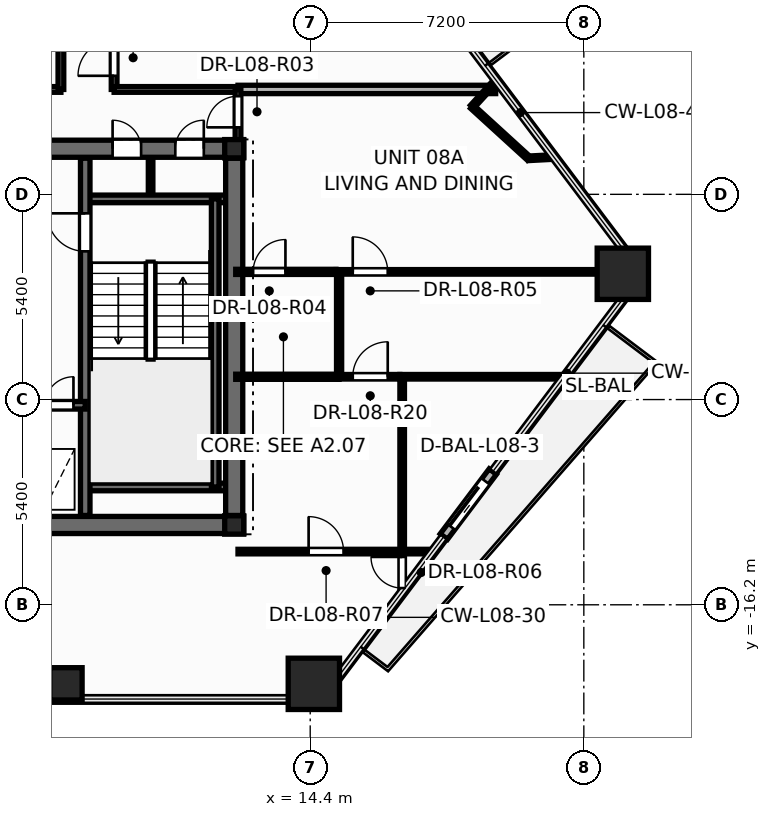
"""IFC4 building model, lengths in metres.
Left out: names, types, materials, properties, quantities, classifications, styles, units other than length and angle.
Written with IfcOpenShell. Run it as: python <this file> out.ifc"""

import sys

from ifc_helpers import new_model, si_unit, direction, frame, frame_2d, origin, origin_2d, place, context, subcontext, project, spatial, rectangle, hollow_rectangle, hollow_circle, i_section, extrude, element, fill, save


model = new_model("IFC4")
c1 = context("Model", 3, precision=1e-05, world=origin(), true_north=direction((0.0, 1.0)))
c2 = subcontext(c1, "Body", "Model", "MODEL_VIEW")
j1 = project(units=[si_unit("LENGTHUNIT", "METRE"), si_unit("PLANEANGLEUNIT", "RADIAN")], contexts=[c1])
p1 = place(None, origin())
s1 = spatial("IfcSite", under=j1, at=p1, CompositionType="ELEMENT")
p2 = place(p1, origin())
s2 = spatial("IfcBuilding", under=s1, at=p2, CompositionType="ELEMENT")
p3 = place(p2, frame((0.0, 0.0, 35.1)))
s3 = spatial("IfcBuildingStorey", under=s2, at=p3, CompositionType="ELEMENT", Elevation=35.1)
for number, where, z_axis, x_axis in (
    (1, (14.496, -18.28, 0.0), (0.0, 0.0, 1.0), (1.0, 0.0, 0.0)),
    (2, (22.626, -7.49, 0.0), (0.0, 0.0, 1.0), (1.0, 0.0, 0.0)),
):
    element("IfcColumn", number, at=place(p3, frame(where, z_axis=z_axis, x_axis=x_axis)), inside=s3, PredefinedType="COLUMN", context=c2, shape_type="SweptSolid", body=[
        extrude(hollow_rectangle(XDim=1.35, YDim=1.35, WallThickness=0.065, at=origin_2d()), origin(), (0.0, 0.0, 1.0), 3.6),
    ])
p4 = place(p3, frame((7.973, -18.28, 0.0), z_axis=(0.0, 0.0, 1.0), x_axis=(1.0, 0.0, 0.0)))
e3 = element("IfcColumn", 3, at=p4, inside=s3, PredefinedType="COLUMN", context=c2, shape_type="SweptSolid", body=[
    extrude(hollow_circle(Radius=0.425, WallThickness=0.038, at=origin_2d()), origin(), (0.0, 0.0, 1.0), 3.6),
])
for number, where, z_axis, x_axis in (
    (4, (12.4, -14.1, 0.0), (0.0, 0.0, 1.0), (1.0, 0.0, 0.0)),
    (5, (12.4, -4.2, 0.0), (0.0, 0.0, 1.0), (1.0, 0.0, 0.0)),
):
    element("IfcColumn", number, at=place(p3, frame(where, z_axis=z_axis, x_axis=x_axis)), inside=s3, PredefinedType="COLUMN", context=c2, shape_type="SweptSolid", body=[
        extrude(i_section(OverallWidth=0.5, OverallDepth=0.482, WebThickness=0.04, FlangeThickness=0.045, at=origin_2d()), origin(), (0.0, 0.0, 1.0), 3.6),
    ])
p5 = place(p3, frame((17.917, -14.405, -0.015), z_axis=(0.0, 0.0, 1.0), x_axis=(0.601896635284, 0.798574004357, 0.0)))
e6 = element("IfcWall", 6, at=p5, inside=s3, PredefinedType="STANDARD", context=c2, shape_type="SweptSolid", body=[
    extrude(rectangle(XDim=2.14, YDim=0.24, at=frame_2d((1.07, 0.0))), origin(), (0.0, 0.0, 1.0), 2.729),
])
p6 = place(p5, frame((0.32, 0.0, 0.015)))
e7 = element("IfcOpeningElement", 7, at=p6, cuts=e6, PredefinedType="OPENING", context=c2, shape_type="SweptSolid", body=[
    extrude(rectangle(XDim=1.506, YDim=2.204, at=frame_2d((0.75, 1.102))), frame((0.0, 0.13, 0.0), z_axis=(0.0, -1.0, 0.0), x_axis=(1.0, 0.0, 0.0)), (0.0, 0.0, 1.0), 0.26),
])
p7 = place(p3, frame((10.2, -5.52, 0.0), z_axis=(0.0, 0.0, 1.0), x_axis=(0.0, 1.0, 0.0)))
e8 = element("IfcWall", 8, at=p7, inside=s3, PredefinedType="PARTITIONING", context=c2, shape_type="SweptSolid", body=[
    extrude(rectangle(XDim=1.12, YDim=0.12, at=frame_2d((0.56, 0.0))), origin(), (0.0, 0.0, 1.0), 3.35),
])
p8 = place(p3, frame((-12.65, -14.1, 0.0), z_axis=(0.0, 0.0, 1.0), x_axis=(1.0, 0.0, 0.0)))
e9 = element("IfcWall", 9, at=p8, inside=s3, PredefinedType="SHEAR", context=c2, shape_type="SweptSolid", body=[
    extrude(rectangle(XDim=25.3, YDim=0.45, at=frame_2d((12.65, 0.0))), origin(), (0.0, 0.0, 1.0), 3.6),
])
p9 = place(p3, frame((-12.65, -4.2, 0.0), z_axis=(0.0, 0.0, 1.0), x_axis=(1.0, 0.0, 0.0)))
e10 = element("IfcWall", 10, at=p9, inside=s3, PredefinedType="SHEAR", context=c2, shape_type="SweptSolid", body=[
    extrude(rectangle(XDim=25.3, YDim=0.45, at=frame_2d((12.65, 0.0))), origin(), (0.0, 0.0, 1.0), 3.6),
])
p10 = place(p9, frame((0.95, 0.0, 0.0)))
e11 = element("IfcOpeningElement", 11, at=p10, cuts=e10, PredefinedType="OPENING", context=c2, shape_type="SweptSolid", body=[
    extrude(rectangle(XDim=0.756, YDim=2.054, at=frame_2d((0.375, 1.027))), frame((0.0, 0.235, 0.0), z_axis=(0.0, -1.0, 0.0), x_axis=(1.0, 0.0, 0.0)), (0.0, 0.0, 1.0), 0.47),
])
p11 = place(p9, frame((2.6, 0.0, 0.0)))
e12 = element("IfcOpeningElement", 12, at=p11, cuts=e10, PredefinedType="OPENING", context=c2, shape_type="SweptSolid", body=[
    extrude(rectangle(XDim=0.756, YDim=2.054, at=frame_2d((0.375, 1.027))), frame((0.0, 0.235, 0.0), z_axis=(0.0, -1.0, 0.0), x_axis=(1.0, 0.0, 0.0)), (0.0, 0.0, 1.0), 0.47),
])
p12 = place(p9, frame((21.85, 0.0, 0.0)))
e13 = element("IfcOpeningElement", 13, at=p12, cuts=e10, PredefinedType="OPENING", context=c2, shape_type="SweptSolid", body=[
    extrude(rectangle(XDim=0.756, YDim=2.054, at=frame_2d((0.375, 1.027))), frame((0.0, 0.235, 0.0), z_axis=(0.0, -1.0, 0.0), x_axis=(1.0, 0.0, 0.0)), (0.0, 0.0, 1.0), 0.47),
])
p13 = place(p9, frame((23.5, 0.0, 0.0)))
e14 = element("IfcOpeningElement", 14, at=p13, cuts=e10, PredefinedType="OPENING", context=c2, shape_type="SweptSolid", body=[
    extrude(rectangle(XDim=0.756, YDim=2.054, at=frame_2d((0.375, 1.027))), frame((0.0, 0.235, 0.0), z_axis=(0.0, -1.0, 0.0), x_axis=(1.0, 0.0, 0.0)), (0.0, 0.0, 1.0), 0.47),
])
p14 = place(p9, frame((5.85, 0.0, 0.0)))
e15 = element("IfcOpeningElement", 15, at=p14, cuts=e10, PredefinedType="OPENING", context=c2, shape_type="SweptSolid", body=[
    extrude(rectangle(XDim=1.006, YDim=2.104, at=frame_2d((0.5, 1.052))), frame((0.0, 0.235, 0.0), z_axis=(0.0, -1.0, 0.0), x_axis=(1.0, 0.0, 0.0)), (0.0, 0.0, 1.0), 0.47),
])
p15 = place(p9, frame((10.35, 0.0, 0.0)))
e16 = element("IfcOpeningElement", 16, at=p15, cuts=e10, PredefinedType="OPENING", context=c2, shape_type="SweptSolid", body=[
    extrude(rectangle(XDim=1.406, YDim=2.154, at=frame_2d((0.7, 1.077))), frame((0.0, 0.235, 0.0), z_axis=(0.0, -1.0, 0.0), x_axis=(1.0, 0.0, 0.0)), (0.0, 0.0, 1.0), 0.47),
])
p16 = place(p9, frame((18.45, 0.0, 0.0)))
e17 = element("IfcOpeningElement", 17, at=p16, cuts=e10, PredefinedType="OPENING", context=c2, shape_type="SweptSolid", body=[
    extrude(rectangle(XDim=1.006, YDim=2.104, at=frame_2d((0.5, 1.052))), frame((0.0, 0.235, 0.0), z_axis=(0.0, -1.0, 0.0), x_axis=(1.0, 0.0, 0.0)), (0.0, 0.0, 1.0), 0.47),
])
for number, where, z_axis, x_axis in (
    (18, (8.48, -5.52, 0.0), (0.0, 0.0, 1.0), (1.0, 0.0, 0.0)),
    (19, (8.48, -13.1, 0.0), (0.0, 0.0, 1.0), (1.0, 0.0, 0.0)),
):
    element("IfcWall", number, at=place(p3, frame(where, z_axis=z_axis, x_axis=x_axis)), inside=s3, PredefinedType="SOLIDWALL", context=c2, shape_type="SweptSolid", body=[
        extrude(rectangle(XDim=3.87, YDim=0.2, at=frame_2d((1.935, 0.0))), origin(), (0.0, 0.0, 1.0), 3.6),
    ])
p17 = place(p3, frame((11.9, -13.1, 0.0), z_axis=(0.0, 0.0, 1.0), x_axis=(0.0, 1.0, 0.0)))
e20 = element("IfcWall", 20, at=p17, inside=s3, PredefinedType="SOLIDWALL", context=c2, shape_type="SweptSolid", body=[
    extrude(rectangle(XDim=7.58, YDim=0.2, at=frame_2d((3.79, 0.0))), origin(), (0.0, 0.0, 1.0), 3.6),
])
p18 = place(p3, frame((8.48, -13.85, 0.0), z_axis=(0.0, 0.0, 1.0), x_axis=(0.0, 1.0, 0.0)))
e21 = element("IfcWall", 21, at=p18, inside=s3, PredefinedType="SHEAR", context=c2, shape_type="SweptSolid", body=[
    extrude(rectangle(XDim=9.4, YDim=0.25, at=frame_2d((4.7, 0.0))), origin(), (0.0, 0.0, 1.0), 3.6),
])
p19 = place(p18, frame((6.95, 0.0, 0.0)))
e22 = element("IfcOpeningElement", 22, at=p19, cuts=e21, PredefinedType="OPENING", context=c2, shape_type="SweptSolid", body=[
    extrude(rectangle(XDim=1.006, YDim=2.104, at=frame_2d((0.5, 1.052))), frame((0.0, 0.135, 0.0), z_axis=(0.0, -1.0, 0.0), x_axis=(1.0, 0.0, 0.0)), (0.0, 0.0, 1.0), 0.27),
])
p20 = place(p3, frame((5.12, -10.95, 0.0), z_axis=(0.0, 0.0, 1.0), x_axis=(1.0, 0.0, 0.0)))
e23 = element("IfcWall", 23, at=p20, inside=s3, PredefinedType="SOLIDWALL", context=c2, shape_type="SweptSolid", body=[
    extrude(rectangle(XDim=3.36, YDim=0.2, at=frame_2d((1.68, 0.0))), origin(), (0.0, 0.0, 1.0), 3.6),
])
p21 = place(p20, frame((0.42, 0.0, 0.0)))
e24 = element("IfcOpeningElement", 24, at=p21, cuts=e23, PredefinedType="OPENING", context=c2, shape_type="SweptSolid", body=[
    extrude(rectangle(XDim=1.106, YDim=2.104, at=frame_2d((0.55, 1.052))), frame((0.0, 0.11, 0.0), z_axis=(0.0, -1.0, 0.0), x_axis=(1.0, 0.0, 0.0)), (0.0, 0.0, 1.0), 0.22),
])
p22 = place(p20, frame((2.3, 0.0, 0.0)))
e25 = element("IfcOpeningElement", 25, at=p22, cuts=e23, PredefinedType="OPENING", context=c2, shape_type="SweptSolid", body=[
    extrude(rectangle(XDim=0.756, YDim=2.054, at=frame_2d((0.375, 1.027))), frame((0.0, 0.11, 0.0), z_axis=(0.0, -1.0, 0.0), x_axis=(1.0, 0.0, 0.0)), (0.0, 0.0, 1.0), 0.22),
])
p23 = place(p3, frame((12.4, -13.85, 0.0), z_axis=(0.0, 0.0, 1.0), x_axis=(0.0, 1.0, 0.0)))
e26 = element("IfcWall", 26, at=p23, inside=s3, PredefinedType="SHEAR", context=c2, shape_type="SweptSolid", body=[
    extrude(rectangle(XDim=9.4, YDim=0.45, at=frame_2d((4.7, 0.0))), origin(), (0.0, 0.0, 1.0), 3.6),
])
p24 = place(p3, frame((-5.32, -2.64, 0.0), z_axis=(0.0, 0.0, 1.0), x_axis=(1.0, 0.0, 0.0)))
e27 = element("IfcWall", 27, at=p24, inside=s3, PredefinedType="PARTITIONING", context=c2, shape_type="SweptSolid", body=[
    extrude(rectangle(XDim=13.16, YDim=0.15, at=frame_2d((6.58, 0.0))), origin(), (0.0, 0.0, 1.0), 2.325),
])
p25 = place(p24, frame((0.439, 0.0, 0.0)))
e28 = element("IfcOpeningElement", 28, at=p25, cuts=e27, PredefinedType="OPENING", context=c2, shape_type="SweptSolid", body=[
    extrude(rectangle(XDim=0.956, YDim=2.104, at=frame_2d((0.475, 1.052))), frame((0.0, 0.085, 0.0), z_axis=(0.0, -1.0, 0.0), x_axis=(1.0, 0.0, 0.0)), (0.0, 0.0, 1.0), 0.17),
])
p26 = place(p3, frame((9.24, -2.64, 0.0), z_axis=(0.0, 0.0, 1.0), x_axis=(0.0, 1.0, 0.0)))
e29 = element("IfcWall", 29, at=p26, inside=s3, PredefinedType="PARTITIONING", context=c2, shape_type="SweptSolid", body=[
    extrude(rectangle(XDim=8.84, YDim=0.15, at=frame_2d((4.42, 0.0))), origin(), (0.0, 0.0, 1.0), 2.325),
])
p27 = place(p26, frame((0.359, 0.0, 0.0)))
e30 = element("IfcOpeningElement", 30, at=p27, cuts=e29, PredefinedType="OPENING", context=c2, shape_type="SweptSolid", body=[
    extrude(rectangle(XDim=0.956, YDim=2.104, at=frame_2d((0.475, 1.052))), frame((0.0, 0.085, 0.0), z_axis=(0.0, -1.0, 0.0), x_axis=(1.0, 0.0, 0.0)), (0.0, 0.0, 1.0), 0.17),
])
p28 = place(p3, frame((15.08, -7.44, 0.0), z_axis=(0.0, 0.0, 1.0), x_axis=(1.0, 0.0, 0.0)))
e31 = element("IfcWall", 31, at=p28, inside=s3, PredefinedType="PARTITIONING", context=c2, shape_type="SweptSolid", body=[
    extrude(rectangle(XDim=8.009, YDim=0.12, at=frame_2d((4.005, 0.0))), origin(), (0.0, 0.0, 1.0), 2.325),
])
p29 = place(p28, frame((0.439, 0.0, 0.0)))
e32 = element("IfcOpeningElement", 32, at=p29, cuts=e31, PredefinedType="OPENING", context=c2, shape_type="SweptSolid", body=[
    extrude(rectangle(XDim=0.926, YDim=2.104, at=frame_2d((0.46, 1.052))), frame((0.0, 0.07, 0.0), z_axis=(0.0, -1.0, 0.0), x_axis=(1.0, 0.0, 0.0)), (0.0, 0.0, 1.0), 0.14),
])
p30 = place(p3, frame((12.5, -2.64, 0.0), z_axis=(0.0, 0.0, 1.0), x_axis=(1.0, 0.0, 0.0)))
e33 = element("IfcWall", 33, at=p30, inside=s3, PredefinedType="PARTITIONING", context=c2, shape_type="SweptSolid", body=[
    extrude(rectangle(XDim=6.78, YDim=0.22, at=frame_2d((3.39, 0.0))), origin(), (0.0, 0.0, 1.0), 2.713),
])
p31 = place(p3, frame((16.82, -15.861, 0.0), z_axis=(0.0, 0.0, 1.0), x_axis=(0.0, 1.0, 0.0)))
e34 = element("IfcWall", 34, at=p31, inside=s3, PredefinedType="PARTITIONING", context=c2, shape_type="SweptSolid", body=[
    extrude(rectangle(XDim=5.661, YDim=0.12, at=frame_2d((2.83, 0.0))), origin(), (0.0, 0.0, 1.0), 2.713),
])
p32 = place(p31, frame((0.1, 0.0, 0.0)))
e35 = element("IfcOpeningElement", 35, at=p32, cuts=e34, PredefinedType="OPENING", context=c2, shape_type="SweptSolid", body=[
    extrude(rectangle(XDim=0.826, YDim=2.104, at=frame_2d((0.41, 1.052))), frame((0.0, 0.07, 0.0), z_axis=(0.0, -1.0, 0.0), x_axis=(1.0, 0.0, 0.0)), (0.0, 0.0, 1.0), 0.14),
])
p33 = place(p3, frame((12.5, -14.8, 0.0), z_axis=(0.0, 0.0, 1.0), x_axis=(1.0, 0.0, 0.0)))
e36 = element("IfcWall", 36, at=p33, inside=s3, PredefinedType="PARTITIONING", context=c2, shape_type="SweptSolid", body=[
    extrude(rectangle(XDim=5.119, YDim=0.12, at=frame_2d((2.56, 0.0))), origin(), (0.0, 0.0, 1.0), 2.325),
])
p34 = place(p33, frame((1.858, 0.0, 0.0)))
e37 = element("IfcOpeningElement", 37, at=p34, cuts=e36, PredefinedType="OPENING", context=c2, shape_type="SweptSolid", body=[
    extrude(rectangle(XDim=0.926, YDim=2.104, at=frame_2d((0.46, 1.052))), frame((0.0, 0.07, 0.0), z_axis=(0.0, -1.0, 0.0), x_axis=(1.0, 0.0, 0.0)), (0.0, 0.0, 1.0), 0.14),
])
p35 = place(p3, frame((16.76, -10.2, 0.0), z_axis=(0.0, 0.0, 1.0), x_axis=(1.0, 0.0, 0.0)))
e38 = element("IfcWall", 38, at=p35, inside=s3, PredefinedType="PARTITIONING", context=c2, shape_type="SweptSolid", body=[
    extrude(rectangle(XDim=4.325, YDim=0.12, at=frame_2d((2.163, 0.0))), origin(), (0.0, 0.0, 1.0), 2.713),
])
p36 = place(p3, frame((7.84, -2.64, 0.0), z_axis=(0.0, 0.0, 1.0), x_axis=(0.0, 1.0, 0.0)))
e39 = element("IfcWall", 39, at=p36, inside=s3, PredefinedType="PARTITIONING", context=c2, shape_type="SweptSolid", body=[
    extrude(rectangle(XDim=6.5, YDim=0.15, at=frame_2d((3.25, 0.0))), origin(), (0.0, 0.0, 1.0), 2.325),
])
p37 = place(p3, frame((9.24, -2.64, 0.0), z_axis=(0.0, 0.0, 1.0), x_axis=(1.0, 0.0, 0.0)))
e40 = element("IfcWall", 40, at=p37, inside=s3, PredefinedType="PARTITIONING", context=c2, shape_type="SweptSolid", body=[
    extrude(rectangle(XDim=3.26, YDim=0.15, at=frame_2d((1.63, 0.0))), origin(), (0.0, 0.0, 1.0), 3.35),
])
p38 = place(p3, frame((12.44, -7.44, 0.0), z_axis=(0.0, 0.0, 1.0), x_axis=(1.0, 0.0, 0.0)))
e41 = element("IfcWall", 41, at=p38, inside=s3, PredefinedType="PARTITIONING", context=c2, shape_type="SweptSolid", body=[
    extrude(rectangle(XDim=2.638, YDim=0.135, at=frame_2d((1.319, 0.0))), origin(), (0.0, 0.0, 1.0), 2.713),
])
p39 = place(p38, frame((0.458, 0.0, 0.0)))
e42 = element("IfcOpeningElement", 42, at=p39, cuts=e41, PredefinedType="OPENING", context=c2, shape_type="SweptSolid", body=[
    extrude(rectangle(XDim=0.856, YDim=2.104, at=frame_2d((0.425, 1.052))), frame((0.0, 0.078, 0.0), z_axis=(0.0, -1.0, 0.0), x_axis=(1.0, 0.0, 0.0)), (0.0, 0.0, 1.0), 0.155),
])
p40 = place(p3, frame((15.16, -10.2, 0.0), z_axis=(0.0, 0.0, 1.0), x_axis=(0.0, 1.0, 0.0)))
e43 = element("IfcWall", 43, at=p40, inside=s3, PredefinedType="PARTITIONING", context=c2, shape_type="SweptSolid", body=[
    extrude(rectangle(XDim=2.76, YDim=0.135, at=frame_2d((1.38, 0.0))), origin(), (0.0, 0.0, 1.0), 3.35),
])
p41 = place(p3, frame((12.44, -10.2, 0.0), z_axis=(0.0, 0.0, 1.0), x_axis=(1.0, 0.0, 0.0)))
e44 = element("IfcWall", 44, at=p41, inside=s3, PredefinedType="PARTITIONING", context=c2, shape_type="SweptSolid", body=[
    extrude(rectangle(XDim=2.72, YDim=0.135, at=frame_2d((1.36, 0.0))), origin(), (0.0, 0.0, 1.0), 2.713),
])
p42 = place(p3, frame((20.148, -4.452, 0.0), z_axis=(0.0, 0.0, 1.0), x_axis=(-0.738587935194, 0.674157149325, 0.0)))
e45 = element("IfcWall", 45, at=p42, inside=s3, PredefinedType="PARTITIONING", context=c2, shape_type="SweptSolid", body=[
    extrude(rectangle(XDim=2.012, YDim=0.12, at=frame_2d((1.006, 0.0))), origin(), (0.0, 0.0, 1.0), 3.35),
])
p43 = place(p3, frame((15.16, -10.2, 0.0), z_axis=(0.0, 0.0, 1.0), x_axis=(1.0, 0.0, 0.0)))
e46 = element("IfcWall", 46, at=p43, inside=s3, PredefinedType="PARTITIONING", context=c2, shape_type="SweptSolid", body=[
    extrude(rectangle(XDim=1.598, YDim=0.12, at=frame_2d((0.799, 0.0))), origin(), (0.0, 0.0, 1.0), 3.35),
])
p44 = place(p43, frame((0.36, 0.0, 0.0)))
e47 = element("IfcOpeningElement", 47, at=p44, cuts=e46, PredefinedType="OPENING", context=c2, shape_type="SweptSolid", body=[
    extrude(rectangle(XDim=0.926, YDim=2.104, at=frame_2d((0.46, 1.052))), frame((0.0, 0.07, 0.0), z_axis=(0.0, -1.0, 0.0), x_axis=(1.0, 0.0, 0.0)), (0.0, 0.0, 1.0), 0.14),
])
p45 = place(p3, frame((12.5, -4.24, 0.0), z_axis=(0.0, 0.0, 1.0), x_axis=(0.0, 1.0, 0.0)))
e48 = element("IfcWall", 48, at=p45, inside=s3, PredefinedType="PARTITIONING", context=c2, shape_type="SweptSolid", body=[
    extrude(rectangle(XDim=1.6, YDim=0.15, at=frame_2d((0.8, 0.0))), origin(), (0.0, 0.0, 1.0), 2.325),
])
p46 = place(p45, frame((0.602, 0.0, 0.0)))
e49 = element("IfcOpeningElement", 49, at=p46, cuts=e48, PredefinedType="OPENING", context=c2, shape_type="SweptSolid", body=[
    extrude(rectangle(XDim=0.826, YDim=2.104, at=frame_2d((0.41, 1.052))), frame((0.0, 0.085, 0.0), z_axis=(0.0, -1.0, 0.0), x_axis=(1.0, 0.0, 0.0)), (0.0, 0.0, 1.0), 0.17),
])
p47 = place(p3, frame((18.662, -3.096, 0.0), z_axis=(0.0, 0.0, 1.0), x_axis=(0.674125797279, 0.738616551021, 0.0)))
e50 = element("IfcWall", 50, at=p47, inside=s3, PredefinedType="PARTITIONING", context=c2, shape_type="SweptSolid", body=[
    extrude(rectangle(XDim=0.927, YDim=0.12, at=frame_2d((0.464, 0.0))), origin(), (0.0, 0.0, 1.0), 2.713),
])
p48 = place(p3, frame((20.8, -4.418, 0.0), z_axis=(0.0, 0.0, 1.0), x_axis=(-0.998648640801, -0.051970108975, 0.0)))
e51 = element("IfcWall", 51, at=p48, inside=s3, PredefinedType="PARTITIONING", context=c2, shape_type="SweptSolid", body=[
    extrude(rectangle(XDim=0.653, YDim=0.12, at=frame_2d((0.327, 0.0))), origin(), (0.0, 0.0, 1.0), 2.713),
])
p49 = place(p6, origin())
e52 = element("IfcDoor", 52, at=p49, inside=s3, OperationType="SLIDING_TO_RIGHT", PredefinedType="DOOR", context=c2, shape_type="SweptSolid", body=[
    extrude(rectangle(XDim=1.5, YDim=2.2, at=frame_2d((0.75, 1.1))), frame((0.0, 0.025, 0.0), z_axis=(0.0, -1.0, 0.0), x_axis=(1.0, 0.0, 0.0)), (0.0, 0.0, 1.0), 0.05),
])
fill(e7, e52)
p50 = place(p19, origin())
e53 = element("IfcDoor", 53, at=p50, inside=s3, OperationType="SINGLE_SWING_RIGHT", PredefinedType="DOOR", context=c2, shape_type="SweptSolid", body=[
    extrude(rectangle(XDim=1.0, YDim=2.1, at=frame_2d((0.5, 1.05))), frame((0.0, 0.025, 0.0), z_axis=(0.0, -1.0, 0.0), x_axis=(1.0, 0.0, 0.0)), (0.0, 0.0, 1.0), 0.05),
])
fill(e22, e53)
p51 = place(p22, origin())
e54 = element("IfcDoor", 54, at=p51, inside=s3, OperationType="SINGLE_SWING_RIGHT", PredefinedType="DOOR", context=c2, shape_type="SweptSolid", body=[
    extrude(rectangle(XDim=0.75, YDim=2.05, at=frame_2d((0.375, 1.025))), frame((0.0, 0.025, 0.0), z_axis=(0.0, -1.0, 0.0), x_axis=(1.0, 0.0, 0.0)), (0.0, 0.0, 1.0), 0.05),
])
fill(e25, e54)
p52 = place(p12, origin())
e55 = element("IfcDoor", 55, at=p52, inside=s3, OperationType="SINGLE_SWING_LEFT", PredefinedType="DOOR", context=c2, shape_type="SweptSolid", body=[
    extrude(rectangle(XDim=0.75, YDim=2.05, at=frame_2d((0.375, 1.025))), frame((0.0, 0.025, 0.0), z_axis=(0.0, -1.0, 0.0), x_axis=(1.0, 0.0, 0.0)), (0.0, 0.0, 1.0), 0.05),
])
fill(e13, e55)
p53 = place(p13, origin())
e56 = element("IfcDoor", 56, at=p53, inside=s3, OperationType="SINGLE_SWING_RIGHT", PredefinedType="DOOR", context=c2, shape_type="SweptSolid", body=[
    extrude(rectangle(XDim=0.75, YDim=2.05, at=frame_2d((0.375, 1.025))), frame((0.0, 0.025, 0.0), z_axis=(0.0, -1.0, 0.0), x_axis=(1.0, 0.0, 0.0)), (0.0, 0.0, 1.0), 0.05),
])
fill(e14, e56)
p54 = place(p46, origin())
e57 = element("IfcDoor", 57, at=p54, inside=s3, OperationType="SINGLE_SWING_LEFT", PredefinedType="DOOR", context=c2, shape_type="SweptSolid", body=[
    extrude(rectangle(XDim=0.82, YDim=2.1, at=frame_2d((0.41, 1.05))), frame((0.0, 0.025, 0.0), z_axis=(0.0, -1.0, 0.0), x_axis=(1.0, 0.0, 0.0)), (0.0, 0.0, 1.0), 0.05),
])
fill(e49, e57)
p55 = place(p39, origin())
e58 = element("IfcDoor", 58, at=p55, inside=s3, OperationType="SINGLE_SWING_RIGHT", PredefinedType="DOOR", context=c2, shape_type="SweptSolid", body=[
    extrude(rectangle(XDim=0.85, YDim=2.1, at=frame_2d((0.425, 1.05))), frame((0.0, 0.025, 0.0), z_axis=(0.0, -1.0, 0.0), x_axis=(1.0, 0.0, 0.0)), (0.0, 0.0, 1.0), 0.05),
])
fill(e42, e58)
p56 = place(p29, origin())
e59 = element("IfcDoor", 59, at=p56, inside=s3, OperationType="SINGLE_SWING_LEFT", PredefinedType="DOOR", context=c2, shape_type="SweptSolid", body=[
    extrude(rectangle(XDim=0.92, YDim=2.1, at=frame_2d((0.46, 1.05))), frame((0.0, 0.025, 0.0), z_axis=(0.0, -1.0, 0.0), x_axis=(1.0, 0.0, 0.0)), (0.0, 0.0, 1.0), 0.05),
])
fill(e32, e59)
p57 = place(p32, origin())
e60 = element("IfcDoor", 60, at=p57, inside=s3, OperationType="SINGLE_SWING_RIGHT", PredefinedType="DOOR", context=c2, shape_type="SweptSolid", body=[
    extrude(rectangle(XDim=0.82, YDim=2.1, at=frame_2d((0.41, 1.05))), frame((0.0, 0.025, 0.0), z_axis=(0.0, -1.0, 0.0), x_axis=(1.0, 0.0, 0.0)), (0.0, 0.0, 1.0), 0.05),
])
fill(e35, e60)
p58 = place(p34, origin())
e61 = element("IfcDoor", 61, at=p58, inside=s3, OperationType="SINGLE_SWING_LEFT", PredefinedType="DOOR", context=c2, shape_type="SweptSolid", body=[
    extrude(rectangle(XDim=0.92, YDim=2.1, at=frame_2d((0.46, 1.05))), frame((0.0, 0.025, 0.0), z_axis=(0.0, -1.0, 0.0), x_axis=(1.0, 0.0, 0.0)), (0.0, 0.0, 1.0), 0.05),
])
fill(e37, e61)
p59 = place(p27, origin())
e62 = element("IfcDoor", 62, at=p59, inside=s3, OperationType="SINGLE_SWING_LEFT", PredefinedType="DOOR", context=c2, shape_type="SweptSolid", body=[
    extrude(rectangle(XDim=0.95, YDim=2.1, at=frame_2d((0.475, 1.05))), frame((0.0, 0.025, 0.0), z_axis=(0.0, -1.0, 0.0), x_axis=(1.0, 0.0, 0.0)), (0.0, 0.0, 1.0), 0.05),
])
fill(e30, e62)
p60 = place(p44, origin())
e63 = element("IfcDoor", 63, at=p60, inside=s3, OperationType="SINGLE_SWING_RIGHT", PredefinedType="DOOR", context=c2, shape_type="SweptSolid", body=[
    extrude(rectangle(XDim=0.92, YDim=2.1, at=frame_2d((0.46, 1.05))), frame((0.0, 0.025, 0.0), z_axis=(0.0, -1.0, 0.0), x_axis=(1.0, 0.0, 0.0)), (0.0, 0.0, 1.0), 0.05),
])
fill(e47, e63)
save(model, sys.argv[1])
